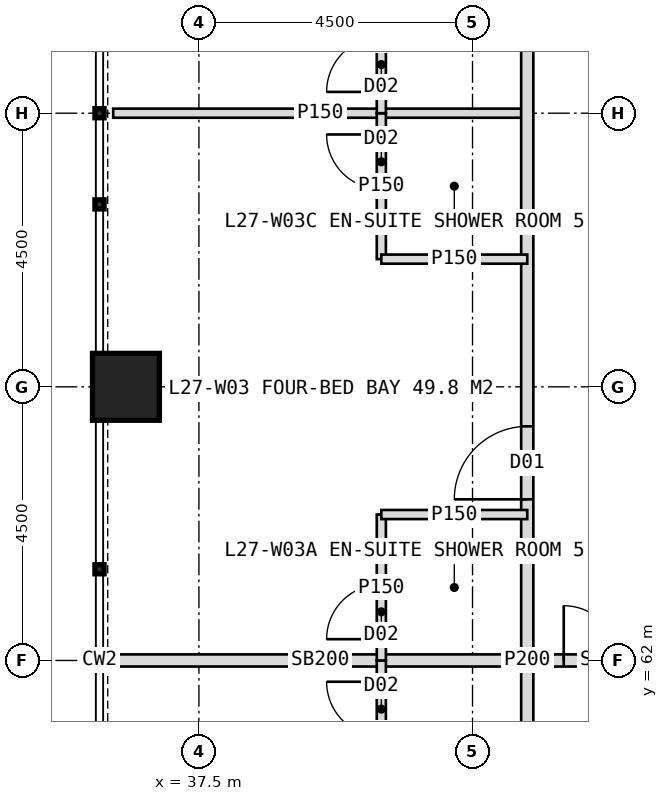
"""IFC4 building model, lengths in metres.
Left out: names, types, materials, properties, quantities, classifications, styles, units other than length and angle.
Written with IfcOpenShell. Run it as: python <this file> out.ifc"""

import sys

from ifc_helpers import new_model, si_unit, direction, frame, frame_2d, origin, origin_2d, place, context, subcontext, project, spatial, rectangle, hollow_rectangle, extrude, element, fill, save


model = new_model("IFC4")
c1 = context("Model", 3, precision=1e-05, world=origin(), true_north=direction((0.0, 1.0)))
c2 = subcontext(c1, "Body", "Model", "MODEL_VIEW")
j1 = project(units=[si_unit("LENGTHUNIT", "METRE"), si_unit("PLANEANGLEUNIT", "RADIAN")], contexts=[c1])
p1 = place(None, origin())
s1 = spatial("IfcSite", under=j1, at=p1, CompositionType="ELEMENT")
p2 = place(p1, origin())
s2 = spatial("IfcBuilding", under=s1, at=p2, CompositionType="ELEMENT")
p3 = place(p2, frame((0.0, 0.0, 116.0)))
s3 = spatial("IfcBuildingStorey", under=s2, at=p3, CompositionType="ELEMENT", Elevation=116.0)
p4 = place(p3, frame((36.3, 66.5, 0.0), z_axis=(0.0, 0.0, 1.0), x_axis=(1.0, 0.0, 0.0)))
e1 = element("IfcColumn", 1, at=p4, inside=s3, PredefinedType="COLUMN", context=c2, shape_type="SweptSolid", body=[
    extrude(hollow_rectangle(XDim=1.1, YDim=1.1, WallThickness=0.1, at=origin_2d()), origin(), (0.0, 0.0, 1.0), 4.0),
])
p5 = place(p3, frame((42.9, 62.0, 0.0), z_axis=(0.0, 0.0, 1.0), x_axis=(-1.0, 0.0, 0.0)))
e2 = element("IfcWall", 2, at=p5, inside=s3, PredefinedType="SOLIDWALL", context=c2, shape_type="SweptSolid", body=[
    extrude(rectangle(XDim=6.81, YDim=0.2, at=frame_2d((3.405, 0.0))), origin(), (0.0, 0.0, 1.0), 2.95),
])
p6 = place(p3, frame((42.9, 71.0, 0.0), z_axis=(0.0, 0.0, 1.0), x_axis=(-1.0, 0.0, 0.0)))
e3 = element("IfcWall", 3, at=p6, inside=s3, PredefinedType="PARTITIONING", context=c2, shape_type="SweptSolid", body=[
    extrude(rectangle(XDim=6.81, YDim=0.15, at=frame_2d((3.405, 0.0))), origin(), (0.0, 0.0, 1.0), 3.75),
])
p7 = place(p3, frame((42.9, 44.9, 0.0), z_axis=(0.0, 0.0, 1.0), x_axis=(0.0, 1.0, 0.0)))
e4 = element("IfcWall", 4, at=p7, inside=s3, PredefinedType="PARTITIONING", context=c2, shape_type="SweptSolid", body=[
    extrude(rectangle(XDim=34.2, YDim=0.2, at=frame_2d((17.1, 0.0))), origin(), (0.0, 0.0, 1.0), 3.75),
])
p8 = place(p7, frame((3.25, 0.0, 0.0)))
e5 = element("IfcOpeningElement", 5, at=p8, cuts=e4, PredefinedType="OPENING", context=c2, shape_type="SweptSolid", body=[
    extrude(rectangle(XDim=1.2, YDim=2.2, at=frame_2d((0.6, 1.1))), frame((0.0, 0.11, 0.0), z_axis=(0.0, -1.0, 0.0), x_axis=(1.0, 0.0, 0.0)), (0.0, 0.0, 1.0), 0.22),
])
p9 = place(p7, frame((10.75, 0.0, 0.0)))
e6 = element("IfcOpeningElement", 6, at=p9, cuts=e4, PredefinedType="OPENING", context=c2, shape_type="SweptSolid", body=[
    extrude(rectangle(XDim=1.2, YDim=2.2, at=frame_2d((0.6, 1.1))), frame((0.0, 0.11, 0.0), z_axis=(0.0, -1.0, 0.0), x_axis=(1.0, 0.0, 0.0)), (0.0, 0.0, 1.0), 0.22),
])
p10 = place(p7, frame((19.75, 0.0, 0.0)))
e7 = element("IfcOpeningElement", 7, at=p10, cuts=e4, PredefinedType="OPENING", context=c2, shape_type="SweptSolid", body=[
    extrude(rectangle(XDim=1.2, YDim=2.2, at=frame_2d((0.6, 1.1))), frame((0.0, 0.11, 0.0), z_axis=(0.0, -1.0, 0.0), x_axis=(1.0, 0.0, 0.0)), (0.0, 0.0, 1.0), 0.22),
])
p11 = place(p7, frame((28.75, 0.0, 0.0)))
e8 = element("IfcOpeningElement", 8, at=p11, cuts=e4, PredefinedType="OPENING", context=c2, shape_type="SweptSolid", body=[
    extrude(rectangle(XDim=1.2, YDim=2.2, at=frame_2d((0.6, 1.1))), frame((0.0, 0.11, 0.0), z_axis=(0.0, -1.0, 0.0), x_axis=(1.0, 0.0, 0.0)), (0.0, 0.0, 1.0), 0.22),
])
p12 = place(p3, frame((40.5, 59.6, 0.0), z_axis=(0.0, 0.0, 1.0), x_axis=(0.0, 1.0, 0.0)))
e9 = element("IfcWall", 9, at=p12, inside=s3, PredefinedType="PARTITIONING", context=c2, shape_type="SweptSolid", body=[
    extrude(rectangle(XDim=2.4, YDim=0.15, at=frame_2d((1.2, 0.0))), origin(), (0.0, 0.0, 1.0), 3.75),
])
p13 = place(p12, frame((1.15, 0.0, 0.0)))
e10 = element("IfcOpeningElement", 10, at=p13, cuts=e9, PredefinedType="OPENING", context=c2, shape_type="SweptSolid", body=[
    extrude(rectangle(XDim=0.9, YDim=2.1, at=frame_2d((0.45, 1.05))), frame((0.0, 0.085, 0.0), z_axis=(0.0, -1.0, 0.0), x_axis=(1.0, 0.0, 0.0)), (0.0, 0.0, 1.0), 0.17),
])
p14 = place(p3, frame((40.5, 62.0, 0.0), z_axis=(0.0, 0.0, 1.0), x_axis=(0.0, 1.0, 0.0)))
e11 = element("IfcWall", 11, at=p14, inside=s3, PredefinedType="PARTITIONING", context=c2, shape_type="SweptSolid", body=[
    extrude(rectangle(XDim=2.4, YDim=0.15, at=frame_2d((1.2, 0.0))), origin(), (0.0, 0.0, 1.0), 3.75),
])
p15 = place(p14, frame((0.35, 0.0, 0.0)))
e12 = element("IfcOpeningElement", 12, at=p15, cuts=e11, PredefinedType="OPENING", context=c2, shape_type="SweptSolid", body=[
    extrude(rectangle(XDim=0.9, YDim=2.1, at=frame_2d((0.45, 1.05))), frame((0.0, 0.085, 0.0), z_axis=(0.0, -1.0, 0.0), x_axis=(1.0, 0.0, 0.0)), (0.0, 0.0, 1.0), 0.17),
])
p16 = place(p3, frame((42.9, 64.4, 0.0), z_axis=(0.0, 0.0, 1.0), x_axis=(-1.0, 0.0, 0.0)))
e13 = element("IfcWall", 13, at=p16, inside=s3, PredefinedType="PARTITIONING", context=c2, shape_type="SweptSolid", body=[
    extrude(rectangle(XDim=2.4, YDim=0.15, at=frame_2d((1.2, 0.0))), origin(), (0.0, 0.0, 1.0), 3.75),
])
p17 = place(p3, frame((40.5, 68.6, 0.0), z_axis=(0.0, 0.0, 1.0), x_axis=(0.0, 1.0, 0.0)))
e14 = element("IfcWall", 14, at=p17, inside=s3, PredefinedType="PARTITIONING", context=c2, shape_type="SweptSolid", body=[
    extrude(rectangle(XDim=2.4, YDim=0.15, at=frame_2d((1.2, 0.0))), origin(), (0.0, 0.0, 1.0), 3.75),
])
p18 = place(p17, frame((1.15, 0.0, 0.0)))
e15 = element("IfcOpeningElement", 15, at=p18, cuts=e14, PredefinedType="OPENING", context=c2, shape_type="SweptSolid", body=[
    extrude(rectangle(XDim=0.9, YDim=2.1, at=frame_2d((0.45, 1.05))), frame((0.0, 0.085, 0.0), z_axis=(0.0, -1.0, 0.0), x_axis=(1.0, 0.0, 0.0)), (0.0, 0.0, 1.0), 0.17),
])
p19 = place(p3, frame((42.9, 68.6, 0.0), z_axis=(0.0, 0.0, 1.0), x_axis=(-1.0, 0.0, 0.0)))
e16 = element("IfcWall", 16, at=p19, inside=s3, PredefinedType="PARTITIONING", context=c2, shape_type="SweptSolid", body=[
    extrude(rectangle(XDim=2.4, YDim=0.15, at=frame_2d((1.2, 0.0))), origin(), (0.0, 0.0, 1.0), 3.75),
])
p20 = place(p3, frame((40.5, 71.0, 0.0), z_axis=(0.0, 0.0, 1.0), x_axis=(0.0, 1.0, 0.0)))
e17 = element("IfcWall", 17, at=p20, inside=s3, PredefinedType="PARTITIONING", context=c2, shape_type="SweptSolid", body=[
    extrude(rectangle(XDim=2.4, YDim=0.15, at=frame_2d((1.2, 0.0))), origin(), (0.0, 0.0, 1.0), 3.75),
])
p21 = place(p20, frame((0.35, 0.0, 0.0)))
e18 = element("IfcOpeningElement", 18, at=p21, cuts=e17, PredefinedType="OPENING", context=c2, shape_type="SweptSolid", body=[
    extrude(rectangle(XDim=0.9, YDim=2.1, at=frame_2d((0.45, 1.05))), frame((0.0, 0.085, 0.0), z_axis=(0.0, -1.0, 0.0), x_axis=(1.0, 0.0, 0.0)), (0.0, 0.0, 1.0), 0.17),
])
p22 = place(p3, frame((45.6, 62.0, 0.0), z_axis=(0.0, 0.0, 1.0), x_axis=(-1.0, 0.0, 0.0)))
e19 = element("IfcWall", 19, at=p22, inside=s3, PredefinedType="SOLIDWALL", context=c2, shape_type="SweptSolid", body=[
    extrude(rectangle(XDim=2.7, YDim=0.2, at=frame_2d((1.35, 0.0))), origin(), (0.0, 0.0, 1.0), 2.95),
])
p23 = place(p22, frame((0.3, 0.0, 0.0)))
e20 = element("IfcOpeningElement", 20, at=p23, cuts=e19, PredefinedType="OPENING", context=c2, shape_type="SweptSolid", body=[
    extrude(rectangle(XDim=1.8, YDim=2.2, at=frame_2d((0.9, 1.1))), frame((0.0, 0.11, 0.0), z_axis=(0.0, -1.0, 0.0), x_axis=(1.0, 0.0, 0.0)), (0.0, 0.0, 1.0), 0.22),
])
p24 = place(p13, origin())
e21 = element("IfcDoor", 21, at=p24, inside=s3, OperationType="SINGLE_SWING_RIGHT", PredefinedType="DOOR", context=c2, shape_type="SweptSolid", body=[
    extrude(rectangle(XDim=0.9, YDim=2.1, at=frame_2d((0.45, 1.05))), frame((0.0, 0.025, 0.0), z_axis=(0.0, -1.0, 0.0), x_axis=(1.0, 0.0, 0.0)), (0.0, 0.0, 1.0), 0.05),
])
fill(e10, e21)
p25 = place(p10, origin())
e22 = element("IfcDoor", 22, at=p25, inside=s3, OperationType="SINGLE_SWING_LEFT", PredefinedType="DOOR", context=c2, shape_type="SweptSolid", body=[
    extrude(rectangle(XDim=1.2, YDim=2.2, at=frame_2d((0.6, 1.1))), frame((0.0, 0.025, 0.0), z_axis=(0.0, -1.0, 0.0), x_axis=(1.0, 0.0, 0.0)), (0.0, 0.0, 1.0), 0.05),
])
fill(e7, e22)
p26 = place(p15, origin())
e23 = element("IfcDoor", 23, at=p26, inside=s3, OperationType="SINGLE_SWING_LEFT", PredefinedType="DOOR", context=c2, shape_type="SweptSolid", body=[
    extrude(rectangle(XDim=0.9, YDim=2.1, at=frame_2d((0.45, 1.05))), frame((0.0, 0.025, 0.0), z_axis=(0.0, -1.0, 0.0), x_axis=(1.0, 0.0, 0.0)), (0.0, 0.0, 1.0), 0.05),
])
fill(e12, e23)
p27 = place(p18, origin())
e24 = element("IfcDoor", 24, at=p27, inside=s3, OperationType="SINGLE_SWING_RIGHT", PredefinedType="DOOR", context=c2, shape_type="SweptSolid", body=[
    extrude(rectangle(XDim=0.9, YDim=2.1, at=frame_2d((0.45, 1.05))), frame((0.0, 0.025, 0.0), z_axis=(0.0, -1.0, 0.0), x_axis=(1.0, 0.0, 0.0)), (0.0, 0.0, 1.0), 0.05),
])
fill(e15, e24)
p28 = place(p21, origin())
e25 = element("IfcDoor", 25, at=p28, inside=s3, OperationType="SINGLE_SWING_LEFT", PredefinedType="DOOR", context=c2, shape_type="SweptSolid", body=[
    extrude(rectangle(XDim=0.9, YDim=2.1, at=frame_2d((0.45, 1.05))), frame((0.0, 0.025, 0.0), z_axis=(0.0, -1.0, 0.0), x_axis=(1.0, 0.0, 0.0)), (0.0, 0.0, 1.0), 0.05),
])
fill(e18, e25)
p29 = place(p23, origin())
e26 = element("IfcDoor", 26, at=p29, inside=s3, OperationType="DOUBLE_DOOR_DOUBLE_SWING", PredefinedType="DOOR", context=c2, shape_type="SweptSolid", body=[
    extrude(rectangle(XDim=1.8, YDim=2.2, at=frame_2d((0.9, 1.1))), frame((0.0, 0.025, 0.0), z_axis=(0.0, -1.0, 0.0), x_axis=(1.0, 0.0, 0.0)), (0.0, 0.0, 1.0), 0.05),
])
fill(e20, e26)
save(model, sys.argv[1])
